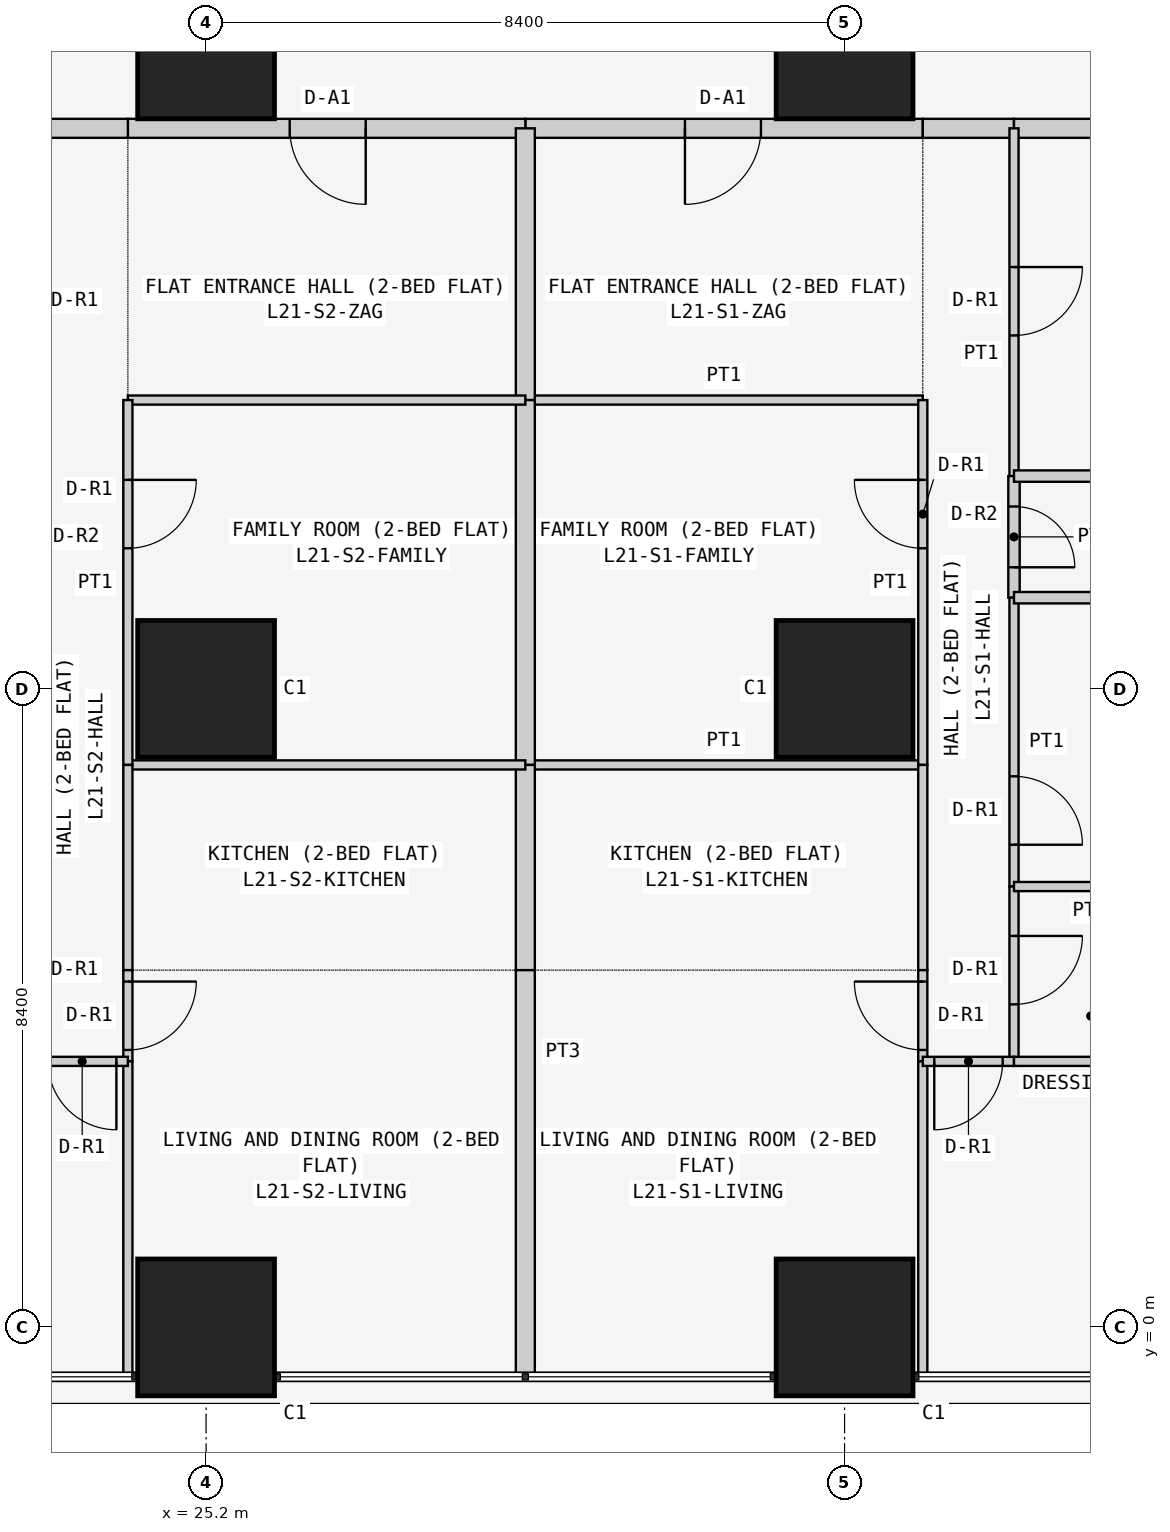
"""IFC4 building model, lengths in metres.
Left out: names, types, materials, properties, quantities, classifications, styles, units other than length and angle.
Written with IfcOpenShell. Run it as: python <this file> out.ifc"""

import sys

from ifc_helpers import new_model, si_unit, direction, frame, frame_2d, origin, origin_2d, place, context, subcontext, project, spatial, rectangle, extrude, element, fill, save


model = new_model("IFC4")
c1 = context("Model", 3, precision=1e-05, world=origin(), true_north=direction((0.0, 1.0)))
c2 = subcontext(c1, "Body", "Model", "MODEL_VIEW")
j1 = project(units=[si_unit("LENGTHUNIT", "METRE"), si_unit("PLANEANGLEUNIT", "RADIAN")], contexts=[c1])
p1 = place(None, origin())
s1 = spatial("IfcSite", under=j1, at=p1, CompositionType="ELEMENT")
p2 = place(p1, origin())
s2 = spatial("IfcBuilding", under=s1, at=p2, CompositionType="ELEMENT")
p3 = place(p2, frame((0.0, 0.0, 84.9)))
s3 = spatial("IfcBuildingStorey", under=s2, at=p3, CompositionType="ELEMENT", Elevation=84.9)
for number, where, z_axis, x_axis in (
    (1, (25.2, 0.0, 0.0), (0.0, 0.0, 1.0), (1.0, 0.0, 0.0)),
    (2, (25.2, 8.4, 0.0), (0.0, 0.0, 1.0), (1.0, 0.0, 0.0)),
    (3, (25.2, 16.8, 0.0), (0.0, 0.0, 1.0), (1.0, 0.0, 0.0)),
    (4, (33.6, 0.0, 0.0), (0.0, 0.0, 1.0), (1.0, 0.0, 0.0)),
    (5, (33.6, 8.4, 0.0), (0.0, 0.0, 1.0), (1.0, 0.0, 0.0)),
    (6, (33.6, 16.8, 0.0), (0.0, 0.0, 1.0), (1.0, 0.0, 0.0)),
):
    element("IfcColumn", number, at=place(p3, frame(where, z_axis=z_axis, x_axis=x_axis)), inside=s3, PredefinedType="COLUMN", context=c2, shape_type="SweptSolid", body=[
        extrude(rectangle(XDim=1.8, YDim=1.8, at=origin_2d()), origin(), (0.0, 0.0, 1.0), 3.6),
    ])
p4 = place(p3, frame((34.629, 15.775, 0.0), z_axis=(0.0, 0.0, 1.0), x_axis=(-1.0, 0.0, 0.0)))
e7 = element("IfcWall", 7, at=p4, inside=s3, PredefinedType="PARTITIONING", context=c2, shape_type="SweptSolid", body=[
    extrude(rectangle(XDim=5.229, YDim=0.25, at=frame_2d((2.615, 0.0))), origin(), (0.0, 0.0, 1.0), 3.45),
])
p5 = place(p4, frame((2.129, 0.0, 0.0)))
e8 = element("IfcOpeningElement", 8, at=p5, cuts=e7, PredefinedType="OPENING", context=c2, shape_type="SweptSolid", body=[
    extrude(rectangle(XDim=1.0, YDim=2.1, at=frame_2d((0.5, 1.05))), frame((0.0, 0.135, 0.0), z_axis=(0.0, -1.0, 0.0), x_axis=(1.0, 0.0, 0.0)), (0.0, 0.0, 1.0), 0.27),
])
p6 = place(p3, frame((35.829, 15.775, 0.0), z_axis=(0.0, 0.0, 1.0), x_axis=(-1.0, 0.0, 0.0)))
e9 = element("IfcWall", 9, at=p6, inside=s3, PredefinedType="PARTITIONING", context=c2, shape_type="SweptSolid", body=[
    extrude(rectangle(XDim=1.2, YDim=0.25, at=frame_2d((0.6, 0.0))), origin(), (0.0, 0.0, 1.0), 3.45),
])
p7 = place(p3, frame((42.7, 15.775, 0.0), z_axis=(0.0, 0.0, 1.0), x_axis=(-1.0, 0.0, 0.0)))
e10 = element("IfcWall", 10, at=p7, inside=s3, PredefinedType="PARTITIONING", context=c2, shape_type="SweptSolid", body=[
    extrude(rectangle(XDim=6.871, YDim=0.25, at=frame_2d((3.436, 0.0))), origin(), (0.0, 0.0, 1.0), 3.45),
])
p8 = place(p3, frame((29.4, 15.775, 0.0), z_axis=(0.0, 0.0, 1.0), x_axis=(-1.0, 0.0, 0.0)))
e11 = element("IfcWall", 11, at=p8, inside=s3, PredefinedType="PARTITIONING", context=c2, shape_type="SweptSolid", body=[
    extrude(rectangle(XDim=5.229, YDim=0.25, at=frame_2d((2.615, 0.0))), origin(), (0.0, 0.0, 1.0), 3.45),
])
p9 = place(p8, frame((2.1, 0.0, 0.0)))
e12 = element("IfcOpeningElement", 12, at=p9, cuts=e11, PredefinedType="OPENING", context=c2, shape_type="SweptSolid", body=[
    extrude(rectangle(XDim=1.0, YDim=2.1, at=frame_2d((0.5, 1.05))), frame((0.0, 0.135, 0.0), z_axis=(0.0, -1.0, 0.0), x_axis=(1.0, 0.0, 0.0)), (0.0, 0.0, 1.0), 0.27),
])
p10 = place(p3, frame((24.171, 15.775, 0.0), z_axis=(0.0, 0.0, 1.0), x_axis=(-1.0, 0.0, 0.0)))
e13 = element("IfcWall", 13, at=p10, inside=s3, PredefinedType="PARTITIONING", context=c2, shape_type="SweptSolid", body=[
    extrude(rectangle(XDim=1.2, YDim=0.25, at=frame_2d((0.6, 0.0))), origin(), (0.0, 0.0, 1.0), 3.45),
])
p11 = place(p3, frame((29.4, 12.2, 0.0), z_axis=(0.0, 0.0, 1.0), x_axis=(1.0, 0.0, 0.0)))
e14 = element("IfcWall", 14, at=p11, inside=s3, PredefinedType="PARTITIONING", context=c2, shape_type="SweptSolid", body=[
    extrude(rectangle(XDim=5.229, YDim=0.12, at=frame_2d((2.615, 0.0))), origin(), (0.0, 0.0, 1.0), 3.45),
])
p12 = place(p3, frame((29.4, 15.775, 0.0), z_axis=(0.0, 0.0, 1.0), x_axis=(0.0, -1.0, 0.0)))
e15 = element("IfcWall", 15, at=p12, inside=s3, PredefinedType="PARTITIONING", context=c2, shape_type="SweptSolid", body=[
    extrude(rectangle(XDim=3.575, YDim=0.25, at=frame_2d((1.788, 0.0))), origin(), (0.0, 0.0, 1.0), 2.848),
])
p13 = place(p3, frame((29.4, 7.4, 0.0), z_axis=(0.0, 0.0, 1.0), x_axis=(1.0, 0.0, 0.0)))
e16 = element("IfcWall", 16, at=p13, inside=s3, PredefinedType="PARTITIONING", context=c2, shape_type="SweptSolid", body=[
    extrude(rectangle(XDim=5.229, YDim=0.12, at=frame_2d((2.615, 0.0))), origin(), (0.0, 0.0, 1.0), 3.45),
])
p14 = place(p3, frame((34.629, 7.4, 0.0), z_axis=(0.0, 0.0, 1.0), x_axis=(0.0, 1.0, 0.0)))
e17 = element("IfcWall", 17, at=p14, inside=s3, PredefinedType="PARTITIONING", context=c2, shape_type="SweptSolid", body=[
    extrude(rectangle(XDim=4.8, YDim=0.12, at=frame_2d((2.4, 0.0))), origin(), (0.0, 0.0, 1.0), 3.45),
])
p15 = place(p14, frame((2.85, 0.0, 0.0)))
e18 = element("IfcOpeningElement", 18, at=p15, cuts=e17, PredefinedType="OPENING", context=c2, shape_type="SweptSolid", body=[
    extrude(rectangle(XDim=0.9, YDim=2.1, at=frame_2d((0.45, 1.05))), frame((0.0, 0.07, 0.0), z_axis=(0.0, -1.0, 0.0), x_axis=(1.0, 0.0, 0.0)), (0.0, 0.0, 1.0), 0.14),
])
p16 = place(p3, frame((29.4, 12.2, 0.0), z_axis=(0.0, 0.0, 1.0), x_axis=(0.0, -1.0, 0.0)))
e19 = element("IfcWall", 19, at=p16, inside=s3, PredefinedType="PARTITIONING", context=c2, shape_type="SweptSolid", body=[
    extrude(rectangle(XDim=4.8, YDim=0.25, at=frame_2d((2.4, 0.0))), origin(), (0.0, 0.0, 1.0), 2.848),
])
p17 = place(p3, frame((34.629, 4.7, 0.0), z_axis=(0.0, 0.0, 1.0), x_axis=(0.0, 1.0, 0.0)))
e20 = element("IfcWall", 20, at=p17, inside=s3, PredefinedType="PARTITIONING", context=c2, shape_type="SweptSolid", body=[
    extrude(rectangle(XDim=2.7, YDim=0.12, at=frame_2d((1.35, 0.0))), origin(), (0.0, 0.0, 1.0), 3.45),
])
p18 = place(p3, frame((29.4, 7.4, 0.0), z_axis=(0.0, 0.0, 1.0), x_axis=(0.0, -1.0, 0.0)))
e21 = element("IfcWall", 21, at=p18, inside=s3, PredefinedType="PARTITIONING", context=c2, shape_type="SweptSolid", body=[
    extrude(rectangle(XDim=2.7, YDim=0.25, at=frame_2d((1.35, 0.0))), origin(), (0.0, 0.0, 1.0), 2.848),
])
p19 = place(p3, frame((34.629, 3.5, 0.0), z_axis=(0.0, 0.0, 1.0), x_axis=(0.0, 1.0, 0.0)))
e22 = element("IfcWall", 22, at=p19, inside=s3, PredefinedType="PARTITIONING", context=c2, shape_type="SweptSolid", body=[
    extrude(rectangle(XDim=1.2, YDim=0.12, at=frame_2d((0.6, 0.0))), origin(), (0.0, 0.0, 1.0), 3.45),
])
p20 = place(p19, frame((0.15, 0.0, 0.0)))
e23 = element("IfcOpeningElement", 23, at=p20, cuts=e22, PredefinedType="OPENING", context=c2, shape_type="SweptSolid", body=[
    extrude(rectangle(XDim=0.9, YDim=2.1, at=frame_2d((0.45, 1.05))), frame((0.0, 0.07, 0.0), z_axis=(0.0, -1.0, 0.0), x_axis=(1.0, 0.0, 0.0)), (0.0, 0.0, 1.0), 0.14),
])
p21 = place(p3, frame((34.629, -0.65, 0.0), z_axis=(0.0, 0.0, 1.0), x_axis=(0.0, 1.0, 0.0)))
e24 = element("IfcWall", 24, at=p21, inside=s3, PredefinedType="PARTITIONING", context=c2, shape_type="SweptSolid", body=[
    extrude(rectangle(XDim=4.15, YDim=0.12, at=frame_2d((2.075, 0.0))), origin(), (0.0, 0.0, 1.0), 3.45),
])
p22 = place(p3, frame((29.4, 4.7, 0.0), z_axis=(0.0, 0.0, 1.0), x_axis=(0.0, -1.0, 0.0)))
e25 = element("IfcWall", 25, at=p22, inside=s3, PredefinedType="PARTITIONING", context=c2, shape_type="SweptSolid", body=[
    extrude(rectangle(XDim=5.35, YDim=0.25, at=frame_2d((2.675, 0.0))), origin(), (0.0, 0.0, 1.0), 2.848),
])
p23 = place(p3, frame((35.829, 11.2, 0.0), z_axis=(0.0, 0.0, 1.0), x_axis=(0.0, 1.0, 0.0)))
e26 = element("IfcWall", 26, at=p23, inside=s3, PredefinedType="PARTITIONING", context=c2, shape_type="SweptSolid", body=[
    extrude(rectangle(XDim=4.575, YDim=0.12, at=frame_2d((2.288, 0.0))), origin(), (0.0, 0.0, 1.0), 3.45),
])
p24 = place(p23, frame((1.85, 0.0, 0.0)))
e27 = element("IfcOpeningElement", 27, at=p24, cuts=e26, PredefinedType="OPENING", context=c2, shape_type="SweptSolid", body=[
    extrude(rectangle(XDim=0.9, YDim=2.1, at=frame_2d((0.45, 1.05))), frame((0.0, 0.07, 0.0), z_axis=(0.0, -1.0, 0.0), x_axis=(1.0, 0.0, 0.0)), (0.0, 0.0, 1.0), 0.14),
])
p25 = place(p3, frame((35.829, 9.6, 0.0), z_axis=(0.0, 0.0, 1.0), x_axis=(0.0, 1.0, 0.0)))
e28 = element("IfcWall", 28, at=p25, inside=s3, PredefinedType="PARTITIONING", context=c2, shape_type="SweptSolid", body=[
    extrude(rectangle(XDim=1.6, YDim=0.15, at=frame_2d((0.8, 0.0))), origin(), (0.0, 0.0, 1.0), 3.45),
])
p26 = place(p25, frame((0.4, 0.0, 0.0)))
e29 = element("IfcOpeningElement", 29, at=p26, cuts=e28, PredefinedType="OPENING", context=c2, shape_type="SweptSolid", body=[
    extrude(rectangle(XDim=0.8, YDim=2.1, at=frame_2d((0.4, 1.05))), frame((0.0, 0.085, 0.0), z_axis=(0.0, -1.0, 0.0), x_axis=(1.0, 0.0, 0.0)), (0.0, 0.0, 1.0), 0.17),
])
p27 = place(p3, frame((35.829, 5.8, 0.0), z_axis=(0.0, 0.0, 1.0), x_axis=(0.0, 1.0, 0.0)))
e30 = element("IfcWall", 30, at=p27, inside=s3, PredefinedType="PARTITIONING", context=c2, shape_type="SweptSolid", body=[
    extrude(rectangle(XDim=3.8, YDim=0.12, at=frame_2d((1.9, 0.0))), origin(), (0.0, 0.0, 1.0), 3.45),
])
p28 = place(p27, frame((0.55, 0.0, 0.0)))
e31 = element("IfcOpeningElement", 31, at=p28, cuts=e30, PredefinedType="OPENING", context=c2, shape_type="SweptSolid", body=[
    extrude(rectangle(XDim=0.9, YDim=2.1, at=frame_2d((0.45, 1.05))), frame((0.0, 0.07, 0.0), z_axis=(0.0, -1.0, 0.0), x_axis=(1.0, 0.0, 0.0)), (0.0, 0.0, 1.0), 0.14),
])
p29 = place(p3, frame((35.829, 3.5, 0.0), z_axis=(0.0, 0.0, 1.0), x_axis=(0.0, 1.0, 0.0)))
e32 = element("IfcWall", 32, at=p29, inside=s3, PredefinedType="PARTITIONING", context=c2, shape_type="SweptSolid", body=[
    extrude(rectangle(XDim=2.3, YDim=0.12, at=frame_2d((1.15, 0.0))), origin(), (0.0, 0.0, 1.0), 3.45),
])
p30 = place(p29, frame((0.75, 0.0, 0.0)))
e33 = element("IfcOpeningElement", 33, at=p30, cuts=e32, PredefinedType="OPENING", context=c2, shape_type="SweptSolid", body=[
    extrude(rectangle(XDim=0.9, YDim=2.1, at=frame_2d((0.45, 1.05))), frame((0.0, 0.07, 0.0), z_axis=(0.0, -1.0, 0.0), x_axis=(1.0, 0.0, 0.0)), (0.0, 0.0, 1.0), 0.14),
])
p31 = place(p3, frame((34.629, 3.5, 0.0), z_axis=(0.0, 0.0, 1.0), x_axis=(1.0, 0.0, 0.0)))
e34 = element("IfcWall", 34, at=p31, inside=s3, PredefinedType="PARTITIONING", context=c2, shape_type="SweptSolid", body=[
    extrude(rectangle(XDim=1.2, YDim=0.12, at=frame_2d((0.6, 0.0))), origin(), (0.0, 0.0, 1.0), 3.45),
])
p32 = place(p31, frame((0.151, 0.0, 0.0)))
e35 = element("IfcOpeningElement", 35, at=p32, cuts=e34, PredefinedType="OPENING", context=c2, shape_type="SweptSolid", body=[
    extrude(rectangle(XDim=0.9, YDim=2.1, at=frame_2d((0.45, 1.05))), frame((0.0, 0.07, 0.0), z_axis=(0.0, -1.0, 0.0), x_axis=(1.0, 0.0, 0.0)), (0.0, 0.0, 1.0), 0.14),
])
for number, where, z_axis, x_axis in (
    (36, (35.829, 11.2, 0.0), (0.0, 0.0, 1.0), (1.0, 0.0, 0.0)),
    (37, (35.829, 9.6, 0.0), (0.0, 0.0, 1.0), (1.0, 0.0, 0.0)),
):
    element("IfcWall", number, at=place(p3, frame(where, z_axis=z_axis, x_axis=x_axis)), inside=s3, PredefinedType="PARTITIONING", context=c2, shape_type="SweptSolid", body=[
        extrude(rectangle(XDim=6.871, YDim=0.15, at=frame_2d((3.436, 0.0))), origin(), (0.0, 0.0, 1.0), 3.45),
    ])
for number, where, z_axis, x_axis in (
    (38, (37.829, 5.8, 0.0), (0.0, 0.0, 1.0), (-1.0, 0.0, 0.0)),
    (39, (35.829, 3.5, 0.0), (0.0, 0.0, 1.0), (1.0, 0.0, 0.0)),
):
    element("IfcWall", number, at=place(p3, frame(where, z_axis=z_axis, x_axis=x_axis)), inside=s3, PredefinedType="PARTITIONING", context=c2, shape_type="SweptSolid", body=[
        extrude(rectangle(XDim=2.0, YDim=0.12, at=frame_2d((1.0, 0.0))), origin(), (0.0, 0.0, 1.0), 3.45),
    ])
for number, where, z_axis, x_axis in (
    (40, (29.4, 12.2, 0.0), (0.0, 0.0, 1.0), (-1.0, 0.0, 0.0)),
    (41, (29.4, 7.4, 0.0), (0.0, 0.0, 1.0), (-1.0, 0.0, 0.0)),
):
    element("IfcWall", number, at=place(p3, frame(where, z_axis=z_axis, x_axis=x_axis)), inside=s3, PredefinedType="PARTITIONING", context=c2, shape_type="SweptSolid", body=[
        extrude(rectangle(XDim=5.229, YDim=0.12, at=frame_2d((2.615, 0.0))), origin(), (0.0, 0.0, 1.0), 3.45),
    ])
p33 = place(p3, frame((24.171, 7.4, 0.0), z_axis=(0.0, 0.0, 1.0), x_axis=(0.0, 1.0, 0.0)))
e42 = element("IfcWall", 42, at=p33, inside=s3, PredefinedType="PARTITIONING", context=c2, shape_type="SweptSolid", body=[
    extrude(rectangle(XDim=4.8, YDim=0.12, at=frame_2d((2.4, 0.0))), origin(), (0.0, 0.0, 1.0), 3.45),
])
p34 = place(p33, frame((2.85, 0.0, 0.0)))
e43 = element("IfcOpeningElement", 43, at=p34, cuts=e42, PredefinedType="OPENING", context=c2, shape_type="SweptSolid", body=[
    extrude(rectangle(XDim=0.9, YDim=2.1, at=frame_2d((0.45, 1.05))), frame((0.0, 0.07, 0.0), z_axis=(0.0, -1.0, 0.0), x_axis=(1.0, 0.0, 0.0)), (0.0, 0.0, 1.0), 0.14),
])
p35 = place(p3, frame((24.171, 4.7, 0.0), z_axis=(0.0, 0.0, 1.0), x_axis=(0.0, 1.0, 0.0)))
e44 = element("IfcWall", 44, at=p35, inside=s3, PredefinedType="PARTITIONING", context=c2, shape_type="SweptSolid", body=[
    extrude(rectangle(XDim=2.7, YDim=0.12, at=frame_2d((1.35, 0.0))), origin(), (0.0, 0.0, 1.0), 3.45),
])
p36 = place(p3, frame((24.171, 3.5, 0.0), z_axis=(0.0, 0.0, 1.0), x_axis=(0.0, 1.0, 0.0)))
e45 = element("IfcWall", 45, at=p36, inside=s3, PredefinedType="PARTITIONING", context=c2, shape_type="SweptSolid", body=[
    extrude(rectangle(XDim=1.2, YDim=0.12, at=frame_2d((0.6, 0.0))), origin(), (0.0, 0.0, 1.0), 3.45),
])
p37 = place(p36, frame((0.15, 0.0, 0.0)))
e46 = element("IfcOpeningElement", 46, at=p37, cuts=e45, PredefinedType="OPENING", context=c2, shape_type="SweptSolid", body=[
    extrude(rectangle(XDim=0.9, YDim=2.1, at=frame_2d((0.45, 1.05))), frame((0.0, 0.07, 0.0), z_axis=(0.0, -1.0, 0.0), x_axis=(1.0, 0.0, 0.0)), (0.0, 0.0, 1.0), 0.14),
])
p38 = place(p3, frame((24.171, -0.65, 0.0), z_axis=(0.0, 0.0, 1.0), x_axis=(0.0, 1.0, 0.0)))
e47 = element("IfcWall", 47, at=p38, inside=s3, PredefinedType="PARTITIONING", context=c2, shape_type="SweptSolid", body=[
    extrude(rectangle(XDim=4.15, YDim=0.12, at=frame_2d((2.075, 0.0))), origin(), (0.0, 0.0, 1.0), 3.45),
])
p39 = place(p3, frame((24.171, 3.5, 0.0), z_axis=(0.0, 0.0, 1.0), x_axis=(-1.0, 0.0, 0.0)))
e48 = element("IfcWall", 48, at=p39, inside=s3, PredefinedType="PARTITIONING", context=c2, shape_type="SweptSolid", body=[
    extrude(rectangle(XDim=1.2, YDim=0.12, at=frame_2d((0.6, 0.0))), origin(), (0.0, 0.0, 1.0), 3.45),
])
p40 = place(p39, frame((0.151, 0.0, 0.0)))
e49 = element("IfcOpeningElement", 49, at=p40, cuts=e48, PredefinedType="OPENING", context=c2, shape_type="SweptSolid", body=[
    extrude(rectangle(XDim=0.9, YDim=2.1, at=frame_2d((0.45, 1.05))), frame((0.0, 0.07, 0.0), z_axis=(0.0, -1.0, 0.0), x_axis=(1.0, 0.0, 0.0)), (0.0, 0.0, 1.0), 0.14),
])
p41 = place(p5, origin())
e50 = element("IfcDoor", 50, at=p41, inside=s3, OperationType="SINGLE_SWING_RIGHT", PredefinedType="DOOR", context=c2, shape_type="SweptSolid", body=[
    extrude(rectangle(XDim=1.0, YDim=2.1, at=frame_2d((0.5, 1.05))), frame((0.0, 0.025, 0.0), z_axis=(0.0, -1.0, 0.0), x_axis=(1.0, 0.0, 0.0)), (0.0, 0.0, 1.0), 0.05),
])
fill(e8, e50)
p42 = place(p15, origin())
e51 = element("IfcDoor", 51, at=p42, inside=s3, OperationType="SINGLE_SWING_RIGHT", PredefinedType="DOOR", context=c2, shape_type="SweptSolid", body=[
    extrude(rectangle(XDim=0.9, YDim=2.1, at=frame_2d((0.45, 1.05))), frame((0.0, 0.025, 0.0), z_axis=(0.0, -1.0, 0.0), x_axis=(1.0, 0.0, 0.0)), (0.0, 0.0, 1.0), 0.05),
])
fill(e18, e51)
p43 = place(p20, origin())
e52 = element("IfcDoor", 52, at=p43, inside=s3, OperationType="SINGLE_SWING_RIGHT", PredefinedType="DOOR", context=c2, shape_type="SweptSolid", body=[
    extrude(rectangle(XDim=0.9, YDim=2.1, at=frame_2d((0.45, 1.05))), frame((0.0, 0.025, 0.0), z_axis=(0.0, -1.0, 0.0), x_axis=(1.0, 0.0, 0.0)), (0.0, 0.0, 1.0), 0.05),
])
fill(e23, e52)
p44 = place(p24, frame((0.9, 0.0, 0.0), z_axis=(0.0, 0.0, 1.0), x_axis=(-1.0, 0.0, 0.0)))
e53 = element("IfcDoor", 53, at=p44, inside=s3, OperationType="SINGLE_SWING_LEFT", PredefinedType="DOOR", context=c2, shape_type="SweptSolid", body=[
    extrude(rectangle(XDim=0.9, YDim=2.1, at=frame_2d((0.45, 1.05))), frame((0.0, 0.025, 0.0), z_axis=(0.0, -1.0, 0.0), x_axis=(1.0, 0.0, 0.0)), (0.0, 0.0, 1.0), 0.05),
])
fill(e27, e53)
p45 = place(p26, frame((0.8, 0.0, 0.0), z_axis=(0.0, 0.0, 1.0), x_axis=(-1.0, 0.0, 0.0)))
e54 = element("IfcDoor", 54, at=p45, inside=s3, OperationType="SINGLE_SWING_RIGHT", PredefinedType="DOOR", context=c2, shape_type="SweptSolid", body=[
    extrude(rectangle(XDim=0.8, YDim=2.1, at=frame_2d((0.4, 1.05))), frame((0.0, 0.025, 0.0), z_axis=(0.0, -1.0, 0.0), x_axis=(1.0, 0.0, 0.0)), (0.0, 0.0, 1.0), 0.05),
])
fill(e29, e54)
p46 = place(p28, frame((0.9, 0.0, 0.0), z_axis=(0.0, 0.0, 1.0), x_axis=(-1.0, 0.0, 0.0)))
e55 = element("IfcDoor", 55, at=p46, inside=s3, OperationType="SINGLE_SWING_RIGHT", PredefinedType="DOOR", context=c2, shape_type="SweptSolid", body=[
    extrude(rectangle(XDim=0.9, YDim=2.1, at=frame_2d((0.45, 1.05))), frame((0.0, 0.025, 0.0), z_axis=(0.0, -1.0, 0.0), x_axis=(1.0, 0.0, 0.0)), (0.0, 0.0, 1.0), 0.05),
])
fill(e31, e55)
p47 = place(p30, frame((0.9, 0.0, 0.0), z_axis=(0.0, 0.0, 1.0), x_axis=(-1.0, 0.0, 0.0)))
e56 = element("IfcDoor", 56, at=p47, inside=s3, OperationType="SINGLE_SWING_LEFT", PredefinedType="DOOR", context=c2, shape_type="SweptSolid", body=[
    extrude(rectangle(XDim=0.9, YDim=2.1, at=frame_2d((0.45, 1.05))), frame((0.0, 0.025, 0.0), z_axis=(0.0, -1.0, 0.0), x_axis=(1.0, 0.0, 0.0)), (0.0, 0.0, 1.0), 0.05),
])
fill(e33, e56)
p48 = place(p32, frame((0.9, 0.0, 0.0), z_axis=(0.0, 0.0, 1.0), x_axis=(-1.0, 0.0, 0.0)))
e57 = element("IfcDoor", 57, at=p48, inside=s3, OperationType="SINGLE_SWING_RIGHT", PredefinedType="DOOR", context=c2, shape_type="SweptSolid", body=[
    extrude(rectangle(XDim=0.9, YDim=2.1, at=frame_2d((0.45, 1.05))), frame((0.0, 0.025, 0.0), z_axis=(0.0, -1.0, 0.0), x_axis=(1.0, 0.0, 0.0)), (0.0, 0.0, 1.0), 0.05),
])
fill(e35, e57)
p49 = place(p9, origin())
e58 = element("IfcDoor", 58, at=p49, inside=s3, OperationType="SINGLE_SWING_LEFT", PredefinedType="DOOR", context=c2, shape_type="SweptSolid", body=[
    extrude(rectangle(XDim=1.0, YDim=2.1, at=frame_2d((0.5, 1.05))), frame((0.0, 0.025, 0.0), z_axis=(0.0, -1.0, 0.0), x_axis=(1.0, 0.0, 0.0)), (0.0, 0.0, 1.0), 0.05),
])
fill(e12, e58)
p50 = place(p34, frame((0.9, 0.0, 0.0), z_axis=(0.0, 0.0, 1.0), x_axis=(-1.0, 0.0, 0.0)))
e59 = element("IfcDoor", 59, at=p50, inside=s3, OperationType="SINGLE_SWING_LEFT", PredefinedType="DOOR", context=c2, shape_type="SweptSolid", body=[
    extrude(rectangle(XDim=0.9, YDim=2.1, at=frame_2d((0.45, 1.05))), frame((0.0, 0.025, 0.0), z_axis=(0.0, -1.0, 0.0), x_axis=(1.0, 0.0, 0.0)), (0.0, 0.0, 1.0), 0.05),
])
fill(e43, e59)
p51 = place(p37, frame((0.9, 0.0, 0.0), z_axis=(0.0, 0.0, 1.0), x_axis=(-1.0, 0.0, 0.0)))
e60 = element("IfcDoor", 60, at=p51, inside=s3, OperationType="SINGLE_SWING_LEFT", PredefinedType="DOOR", context=c2, shape_type="SweptSolid", body=[
    extrude(rectangle(XDim=0.9, YDim=2.1, at=frame_2d((0.45, 1.05))), frame((0.0, 0.025, 0.0), z_axis=(0.0, -1.0, 0.0), x_axis=(1.0, 0.0, 0.0)), (0.0, 0.0, 1.0), 0.05),
])
fill(e46, e60)
p52 = place(p40, origin())
e61 = element("IfcDoor", 61, at=p52, inside=s3, OperationType="SINGLE_SWING_LEFT", PredefinedType="DOOR", context=c2, shape_type="SweptSolid", body=[
    extrude(rectangle(XDim=0.9, YDim=2.1, at=frame_2d((0.45, 1.05))), frame((0.0, 0.025, 0.0), z_axis=(0.0, -1.0, 0.0), x_axis=(1.0, 0.0, 0.0)), (0.0, 0.0, 1.0), 0.05),
])
fill(e49, e61)
save(model, sys.argv[1])
